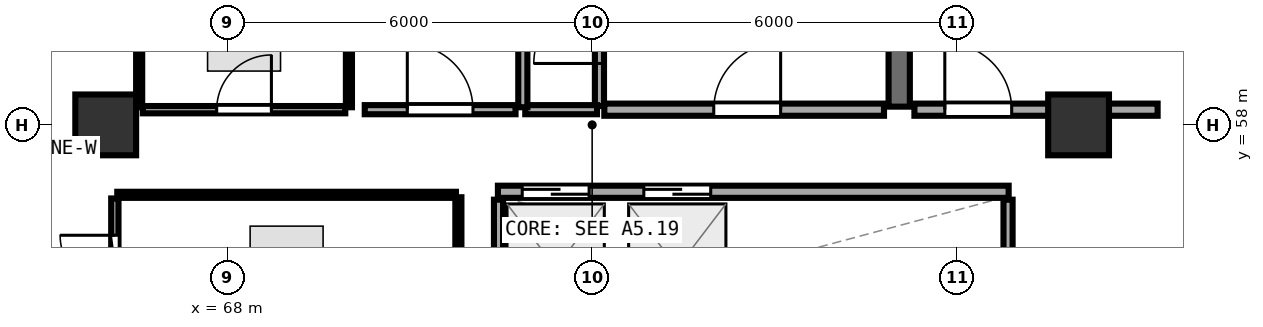
"""IFC4 building model, lengths in metres.
Left out: names, types, materials, properties, quantities, classifications, styles, units other than length and angle.
Written with IfcOpenShell. Run it as: python <this file> out.ifc"""

import sys

from ifc_helpers import new_model, si_unit, direction, frame, frame_2d, origin, origin_2d, place, context, subcontext, project, spatial, rectangle, extrude, element, fill, save


model = new_model("IFC4")
c1 = context("Model", 3, precision=1e-05, world=origin(), true_north=direction((0.0, 1.0)))
c2 = subcontext(c1, "Body", "Model", "MODEL_VIEW")
j1 = project(units=[si_unit("LENGTHUNIT", "METRE"), si_unit("PLANEANGLEUNIT", "RADIAN")], contexts=[c1])
p1 = place(None, origin())
s1 = spatial("IfcSite", under=j1, at=p1, CompositionType="ELEMENT")
p2 = place(p1, origin())
s2 = spatial("IfcBuilding", under=s1, at=p2, CompositionType="ELEMENT")
p3 = place(p2, frame((0.0, 0.0, 263.7)))
s3 = spatial("IfcBuildingStorey", under=s2, at=p3, CompositionType="ELEMENT", Elevation=263.7)
for number, where, z_axis, x_axis in (
    (1, (82.0, 58.0, 0.0), (0.0, 0.0, 1.0), (1.0, 0.0, 0.0)),
    (2, (66.0, 58.0, 0.0), (0.0, 0.0, 1.0), (1.0, 0.0, 0.0)),
):
    element("IfcColumn", number, at=place(p3, frame(where, z_axis=z_axis, x_axis=x_axis)), inside=s3, PredefinedType="PILASTER", context=c2, shape_type="SweptSolid", body=[
        extrude(rectangle(XDim=1.0, YDim=1.0, at=origin_2d()), origin(), (0.0, 0.0, 1.0), 3.75),
    ])
p4 = place(p3, frame((79.05, 58.3, 0.0), z_axis=(0.0, 0.0, 1.0), x_axis=(0.0, 1.0, 0.0)))
e3 = element("IfcWall", 3, at=p4, inside=s3, PredefinedType="SHEAR", context=c2, shape_type="SweptSolid", body=[
    extrude(rectangle(XDim=6.3, YDim=0.35, at=frame_2d((3.15, 0.0))), origin(), (0.0, 0.0, 1.0), 3.49),
])
p5 = place(p3, frame((74.2, 58.25, 0.0), z_axis=(0.0, 0.0, 1.0), x_axis=(1.0, 0.0, 0.0)))
e4 = element("IfcWall", 4, at=p5, inside=s3, PredefinedType="SOLIDWALL", context=c2, shape_type="SweptSolid", body=[
    extrude(rectangle(XDim=4.6, YDim=0.2, at=frame_2d((2.3, 0.0))), origin(), (0.0, 0.0, 1.0), 3.48),
])
p6 = place(p5, frame((1.8, 0.0, 0.0)))
e5 = element("IfcOpeningElement", 5, at=p6, cuts=e4, PredefinedType="OPENING", context=c2, shape_type="SweptSolid", body=[
    extrude(rectangle(XDim=1.1, YDim=2.1, at=frame_2d((0.55, 1.05))), frame((0.0, 0.11, 0.0), z_axis=(0.0, -1.0, 0.0), x_axis=(1.0, 0.0, 0.0)), (0.0, 0.0, 1.0), 0.22),
])
p7 = place(p3, frame((79.3, 58.25, 0.0), z_axis=(0.0, 0.0, 1.0), x_axis=(1.0, 0.0, 0.0)))
e6 = element("IfcWall", 6, at=p7, inside=s3, PredefinedType="SOLIDWALL", context=c2, shape_type="SweptSolid", body=[
    extrude(rectangle(XDim=4.0, YDim=0.2, at=frame_2d((2.0, 0.0))), origin(), (0.0, 0.0, 1.0), 2.775),
])
p8 = place(p7, frame((0.5, 0.0, 0.0)))
e7 = element("IfcOpeningElement", 7, at=p8, cuts=e6, PredefinedType="OPENING", context=c2, shape_type="SweptSolid", body=[
    extrude(rectangle(XDim=1.1, YDim=2.1, at=frame_2d((0.55, 1.05))), frame((0.0, 0.11, 0.0), z_axis=(0.0, -1.0, 0.0), x_axis=(1.0, 0.0, 0.0)), (0.0, 0.0, 1.0), 0.22),
])
p9 = place(p3, frame((72.45, 56.9, 0.0), z_axis=(0.0, 0.0, 1.0), x_axis=(1.0, 0.0, 0.0)))
e8 = element("IfcWall", 8, at=p9, inside=s3, PredefinedType="SOLIDWALL", context=c2, shape_type="SweptSolid", body=[
    extrude(rectangle(XDim=8.4, YDim=0.2, at=frame_2d((4.2, 0.0))), origin(), (0.0, 0.0, 1.0), 3.48),
])
p10 = place(p9, frame((0.4, 0.0, 0.0)))
e9 = element("IfcOpeningElement", 9, at=p10, cuts=e8, PredefinedType="OPENING", context=c2, shape_type="SweptSolid", body=[
    extrude(rectangle(XDim=1.1, YDim=2.1, at=frame_2d((0.55, 1.05))), frame((0.0, 0.11, 0.0), z_axis=(0.0, -1.0, 0.0), x_axis=(1.0, 0.0, 0.0)), (0.0, 0.0, 1.0), 0.22),
])
p11 = place(p9, frame((2.4, 0.0, 0.0)))
e10 = element("IfcOpeningElement", 10, at=p11, cuts=e8, PredefinedType="OPENING", context=c2, shape_type="SweptSolid", body=[
    extrude(rectangle(XDim=1.1, YDim=2.1, at=frame_2d((0.55, 1.05))), frame((0.0, 0.11, 0.0), z_axis=(0.0, -1.0, 0.0), x_axis=(1.0, 0.0, 0.0)), (0.0, 0.0, 1.0), 0.22),
])
for number, where, z_axis, x_axis in (
    (11, (72.46, 54.48, 0.0), (0.0, 0.0, 1.0), (0.0, 1.0, 0.0)),
    (12, (80.84, 54.48, 0.0), (0.0, 0.0, 1.0), (0.0, 1.0, 0.0)),
):
    element("IfcWall", number, at=place(p3, frame(where, z_axis=z_axis, x_axis=x_axis)), inside=s3, PredefinedType="PARTITIONING", context=c2, shape_type="SweptSolid", body=[
        extrude(rectangle(XDim=2.29, YDim=0.15, at=frame_2d((1.145, 0.0))), origin(), (0.0, 0.0, 1.0), 3.48),
    ])
p12 = place(p3, frame((74.12, 58.31, 0.0), z_axis=(0.0, 0.0, 1.0), x_axis=(0.0, 1.0, 0.0)))
e13 = element("IfcWall", 13, at=p12, inside=s3, PredefinedType="PARTITIONING", context=c2, shape_type="SweptSolid", body=[
    extrude(rectangle(XDim=2.48, YDim=0.15, at=frame_2d((1.24, 0.0))), origin(), (0.0, 0.0, 1.0), 3.48),
])
p13 = place(p12, frame((0.7, 0.0, 0.0)))
e14 = element("IfcOpeningElement", 14, at=p13, cuts=e13, PredefinedType="OPENING", context=c2, shape_type="SweptSolid", body=[
    extrude(rectangle(XDim=1.08, YDim=2.1, at=frame_2d((0.54, 1.05))), frame((0.0, 0.085, 0.0), z_axis=(0.0, -1.0, 0.0), x_axis=(1.0, 0.0, 0.0)), (0.0, 0.0, 1.0), 0.17),
])
p14 = place(p3, frame((66.61, 58.25, 0.0), z_axis=(0.0, 0.0, 1.0), x_axis=(1.0, 0.0, 0.0)))
e15 = element("IfcWall", 15, at=p14, inside=s3, PredefinedType="PARTITIONING", context=c2, shape_type="SweptSolid", body=[
    extrude(rectangle(XDim=3.33, YDim=0.12, at=frame_2d((1.665, 0.0))), origin(), (0.0, 0.0, 1.0), 3.48),
])
p15 = place(p14, frame((1.215, 0.0, 0.0)))
e16 = element("IfcOpeningElement", 16, at=p15, cuts=e15, PredefinedType="OPENING", context=c2, shape_type="SweptSolid", body=[
    extrude(rectangle(XDim=0.9, YDim=2.08, at=frame_2d((0.45, 1.04))), frame((0.0, 0.07, 0.0), z_axis=(0.0, -1.0, 0.0), x_axis=(1.0, 0.0, 0.0)), (0.0, 0.0, 1.0), 0.14),
])
p16 = place(p3, frame((70.26, 58.25, 0.0), z_axis=(0.0, 0.0, 1.0), x_axis=(1.0, 0.0, 0.0)))
e17 = element("IfcWall", 17, at=p16, inside=s3, PredefinedType="PARTITIONING", context=c2, shape_type="SweptSolid", body=[
    extrude(rectangle(XDim=2.48, YDim=0.15, at=frame_2d((1.24, 0.0))), origin(), (0.0, 0.0, 1.0), 3.48),
])
p17 = place(p16, frame((0.7, 0.0, 0.0)))
e18 = element("IfcOpeningElement", 18, at=p17, cuts=e17, PredefinedType="OPENING", context=c2, shape_type="SweptSolid", body=[
    extrude(rectangle(XDim=1.08, YDim=2.1, at=frame_2d((0.54, 1.05))), frame((0.0, 0.085, 0.0), z_axis=(0.0, -1.0, 0.0), x_axis=(1.0, 0.0, 0.0)), (0.0, 0.0, 1.0), 0.17),
])
p18 = place(p3, frame((66.15, 54.68, 0.0), z_axis=(0.0, 0.0, 1.0), x_axis=(0.0, 1.0, 0.0)))
e19 = element("IfcWall", 19, at=p18, inside=s3, PredefinedType="PARTITIONING", context=c2, shape_type="SweptSolid", body=[
    extrude(rectangle(XDim=2.11, YDim=0.12, at=frame_2d((1.055, 0.0))), origin(), (0.0, 0.0, 1.0), 2.775),
])
p19 = place(p18, frame((0.605, 0.0, 0.0)))
e20 = element("IfcOpeningElement", 20, at=p19, cuts=e19, PredefinedType="OPENING", context=c2, shape_type="SweptSolid", body=[
    extrude(rectangle(XDim=0.9, YDim=2.08, at=frame_2d((0.45, 1.04))), frame((0.0, 0.07, 0.0), z_axis=(0.0, -1.0, 0.0), x_axis=(1.0, 0.0, 0.0)), (0.0, 0.0, 1.0), 0.14),
])
p20 = place(p3, frame((72.9, 58.25, 0.0), z_axis=(0.0, 0.0, 1.0), x_axis=(1.0, 0.0, 0.0)))
e21 = element("IfcWall", 21, at=p20, inside=s3, PredefinedType="PARTITIONING", context=c2, shape_type="SweptSolid", body=[
    extrude(rectangle(XDim=1.18, YDim=0.15, at=frame_2d((0.59, 0.0))), origin(), (0.0, 0.0, 1.0), 3.48),
])
p21 = place(p3, frame((72.86, 60.81, 0.0), z_axis=(0.0, 0.0, 1.0), x_axis=(0.0, -1.0, 0.0)))
e22 = element("IfcWall", 22, at=p21, inside=s3, PredefinedType="PARTITIONING", context=c2, shape_type="SweptSolid", body=[
    extrude(rectangle(XDim=2.52, YDim=0.15, at=frame_2d((1.26, 0.0))), origin(), (0.0, 0.0, 1.0), 3.48),
])
for number, where, z_axis, x_axis in (
    (23, (70.0, 58.29, 0.0), (0.0, 0.0, 1.0), (0.0, 1.0, 0.0)),
    (24, (66.55, 60.68, 0.0), (0.0, 0.0, 1.0), (0.0, -1.0, 0.0)),
):
    element("IfcWall", number, at=place(p3, frame(where, z_axis=z_axis, x_axis=x_axis)), inside=s3, PredefinedType="PARTITIONING", context=c2, shape_type="SweptSolid", body=[
        extrude(rectangle(XDim=2.39, YDim=0.1, at=frame_2d((1.195, 0.0))), origin(), (0.0, 0.0, 1.0), 3.48),
    ])
p22 = place(p3, frame((71.8, 54.66, 0.0), z_axis=(0.0, 0.0, 1.0), x_axis=(0.0, 1.0, 0.0)))
e25 = element("IfcWall", 25, at=p22, inside=s3, PredefinedType="PARTITIONING", context=c2, shape_type="SweptSolid", body=[
    extrude(rectangle(XDim=2.15, YDim=0.1, at=frame_2d((1.075, 0.0))), origin(), (0.0, 0.0, 1.0), 3.48),
])
p23 = place(p3, frame((71.76, 56.85, 0.0), z_axis=(0.0, 0.0, 1.0), x_axis=(-1.0, 0.0, 0.0)))
e26 = element("IfcWall", 26, at=p23, inside=s3, PredefinedType="PARTITIONING", context=c2, shape_type="SweptSolid", body=[
    extrude(rectangle(XDim=5.57, YDim=0.1, at=frame_2d((2.785, 0.0))), origin(), (0.0, 0.0, 1.0), 2.775),
])
p24 = place(p6, frame((1.1, 0.0, 0.0), z_axis=(0.0, 0.0, 1.0), x_axis=(-1.0, 0.0, 0.0)))
e27 = element("IfcDoor", 27, at=p24, inside=s3, OperationType="SINGLE_SWING_LEFT", PredefinedType="DOOR", context=c2, shape_type="SweptSolid", body=[
    extrude(rectangle(XDim=1.1, YDim=2.1, at=frame_2d((0.55, 1.05))), frame((0.0, 0.025, 0.0), z_axis=(0.0, -1.0, 0.0), x_axis=(1.0, 0.0, 0.0)), (0.0, 0.0, 1.0), 0.05),
])
fill(e5, e27)
p25 = place(p8, frame((1.1, 0.0, 0.0), z_axis=(0.0, 0.0, 1.0), x_axis=(-1.0, 0.0, 0.0)))
e28 = element("IfcDoor", 28, at=p25, inside=s3, OperationType="SINGLE_SWING_RIGHT", PredefinedType="DOOR", context=c2, shape_type="SweptSolid", body=[
    extrude(rectangle(XDim=1.1, YDim=2.1, at=frame_2d((0.55, 1.05))), frame((0.0, 0.025, 0.0), z_axis=(0.0, -1.0, 0.0), x_axis=(1.0, 0.0, 0.0)), (0.0, 0.0, 1.0), 0.05),
])
fill(e7, e28)
p26 = place(p10, origin())
e29 = element("IfcDoor", 29, at=p26, inside=s3, OperationType="DOUBLE_DOOR_SLIDING", PredefinedType="DOOR", context=c2, shape_type="SweptSolid", body=[
    extrude(rectangle(XDim=1.1, YDim=2.1, at=frame_2d((0.55, 1.05))), frame((0.0, 0.025, 0.0), z_axis=(0.0, -1.0, 0.0), x_axis=(1.0, 0.0, 0.0)), (0.0, 0.0, 1.0), 0.05),
])
fill(e9, e29)
p27 = place(p11, origin())
e30 = element("IfcDoor", 30, at=p27, inside=s3, OperationType="DOUBLE_DOOR_SLIDING", PredefinedType="DOOR", context=c2, shape_type="SweptSolid", body=[
    extrude(rectangle(XDim=1.1, YDim=2.1, at=frame_2d((0.55, 1.05))), frame((0.0, 0.025, 0.0), z_axis=(0.0, -1.0, 0.0), x_axis=(1.0, 0.0, 0.0)), (0.0, 0.0, 1.0), 0.05),
])
fill(e10, e30)
p28 = place(p13, origin())
e31 = element("IfcDoor", 31, at=p28, inside=s3, OperationType="SINGLE_SWING_LEFT", PredefinedType="DOOR", context=c2, shape_type="SweptSolid", body=[
    extrude(rectangle(XDim=1.08, YDim=2.1, at=frame_2d((0.54, 1.05))), frame((0.0, 0.025, 0.0), z_axis=(0.0, -1.0, 0.0), x_axis=(1.0, 0.0, 0.0)), (0.0, 0.0, 1.0), 0.05),
])
fill(e14, e31)
p29 = place(p15, origin())
e32 = element("IfcDoor", 32, at=p29, inside=s3, OperationType="SINGLE_SWING_RIGHT", PredefinedType="DOOR", context=c2, shape_type="SweptSolid", body=[
    extrude(rectangle(XDim=0.9, YDim=2.08, at=frame_2d((0.45, 1.04))), frame((0.0, 0.025, 0.0), z_axis=(0.0, -1.0, 0.0), x_axis=(1.0, 0.0, 0.0)), (0.0, 0.0, 1.0), 0.05),
])
fill(e16, e32)
p30 = place(p17, origin())
e33 = element("IfcDoor", 33, at=p30, inside=s3, OperationType="SINGLE_SWING_LEFT", PredefinedType="DOOR", context=c2, shape_type="SweptSolid", body=[
    extrude(rectangle(XDim=1.08, YDim=2.1, at=frame_2d((0.54, 1.05))), frame((0.0, 0.025, 0.0), z_axis=(0.0, -1.0, 0.0), x_axis=(1.0, 0.0, 0.0)), (0.0, 0.0, 1.0), 0.05),
])
fill(e18, e33)
p31 = place(p19, origin())
e34 = element("IfcDoor", 34, at=p31, inside=s3, OperationType="SINGLE_SWING_RIGHT", PredefinedType="DOOR", context=c2, shape_type="SweptSolid", body=[
    extrude(rectangle(XDim=0.9, YDim=2.08, at=frame_2d((0.45, 1.04))), frame((0.0, 0.025, 0.0), z_axis=(0.0, -1.0, 0.0), x_axis=(1.0, 0.0, 0.0)), (0.0, 0.0, 1.0), 0.05),
])
fill(e20, e34)
save(model, sys.argv[1])
